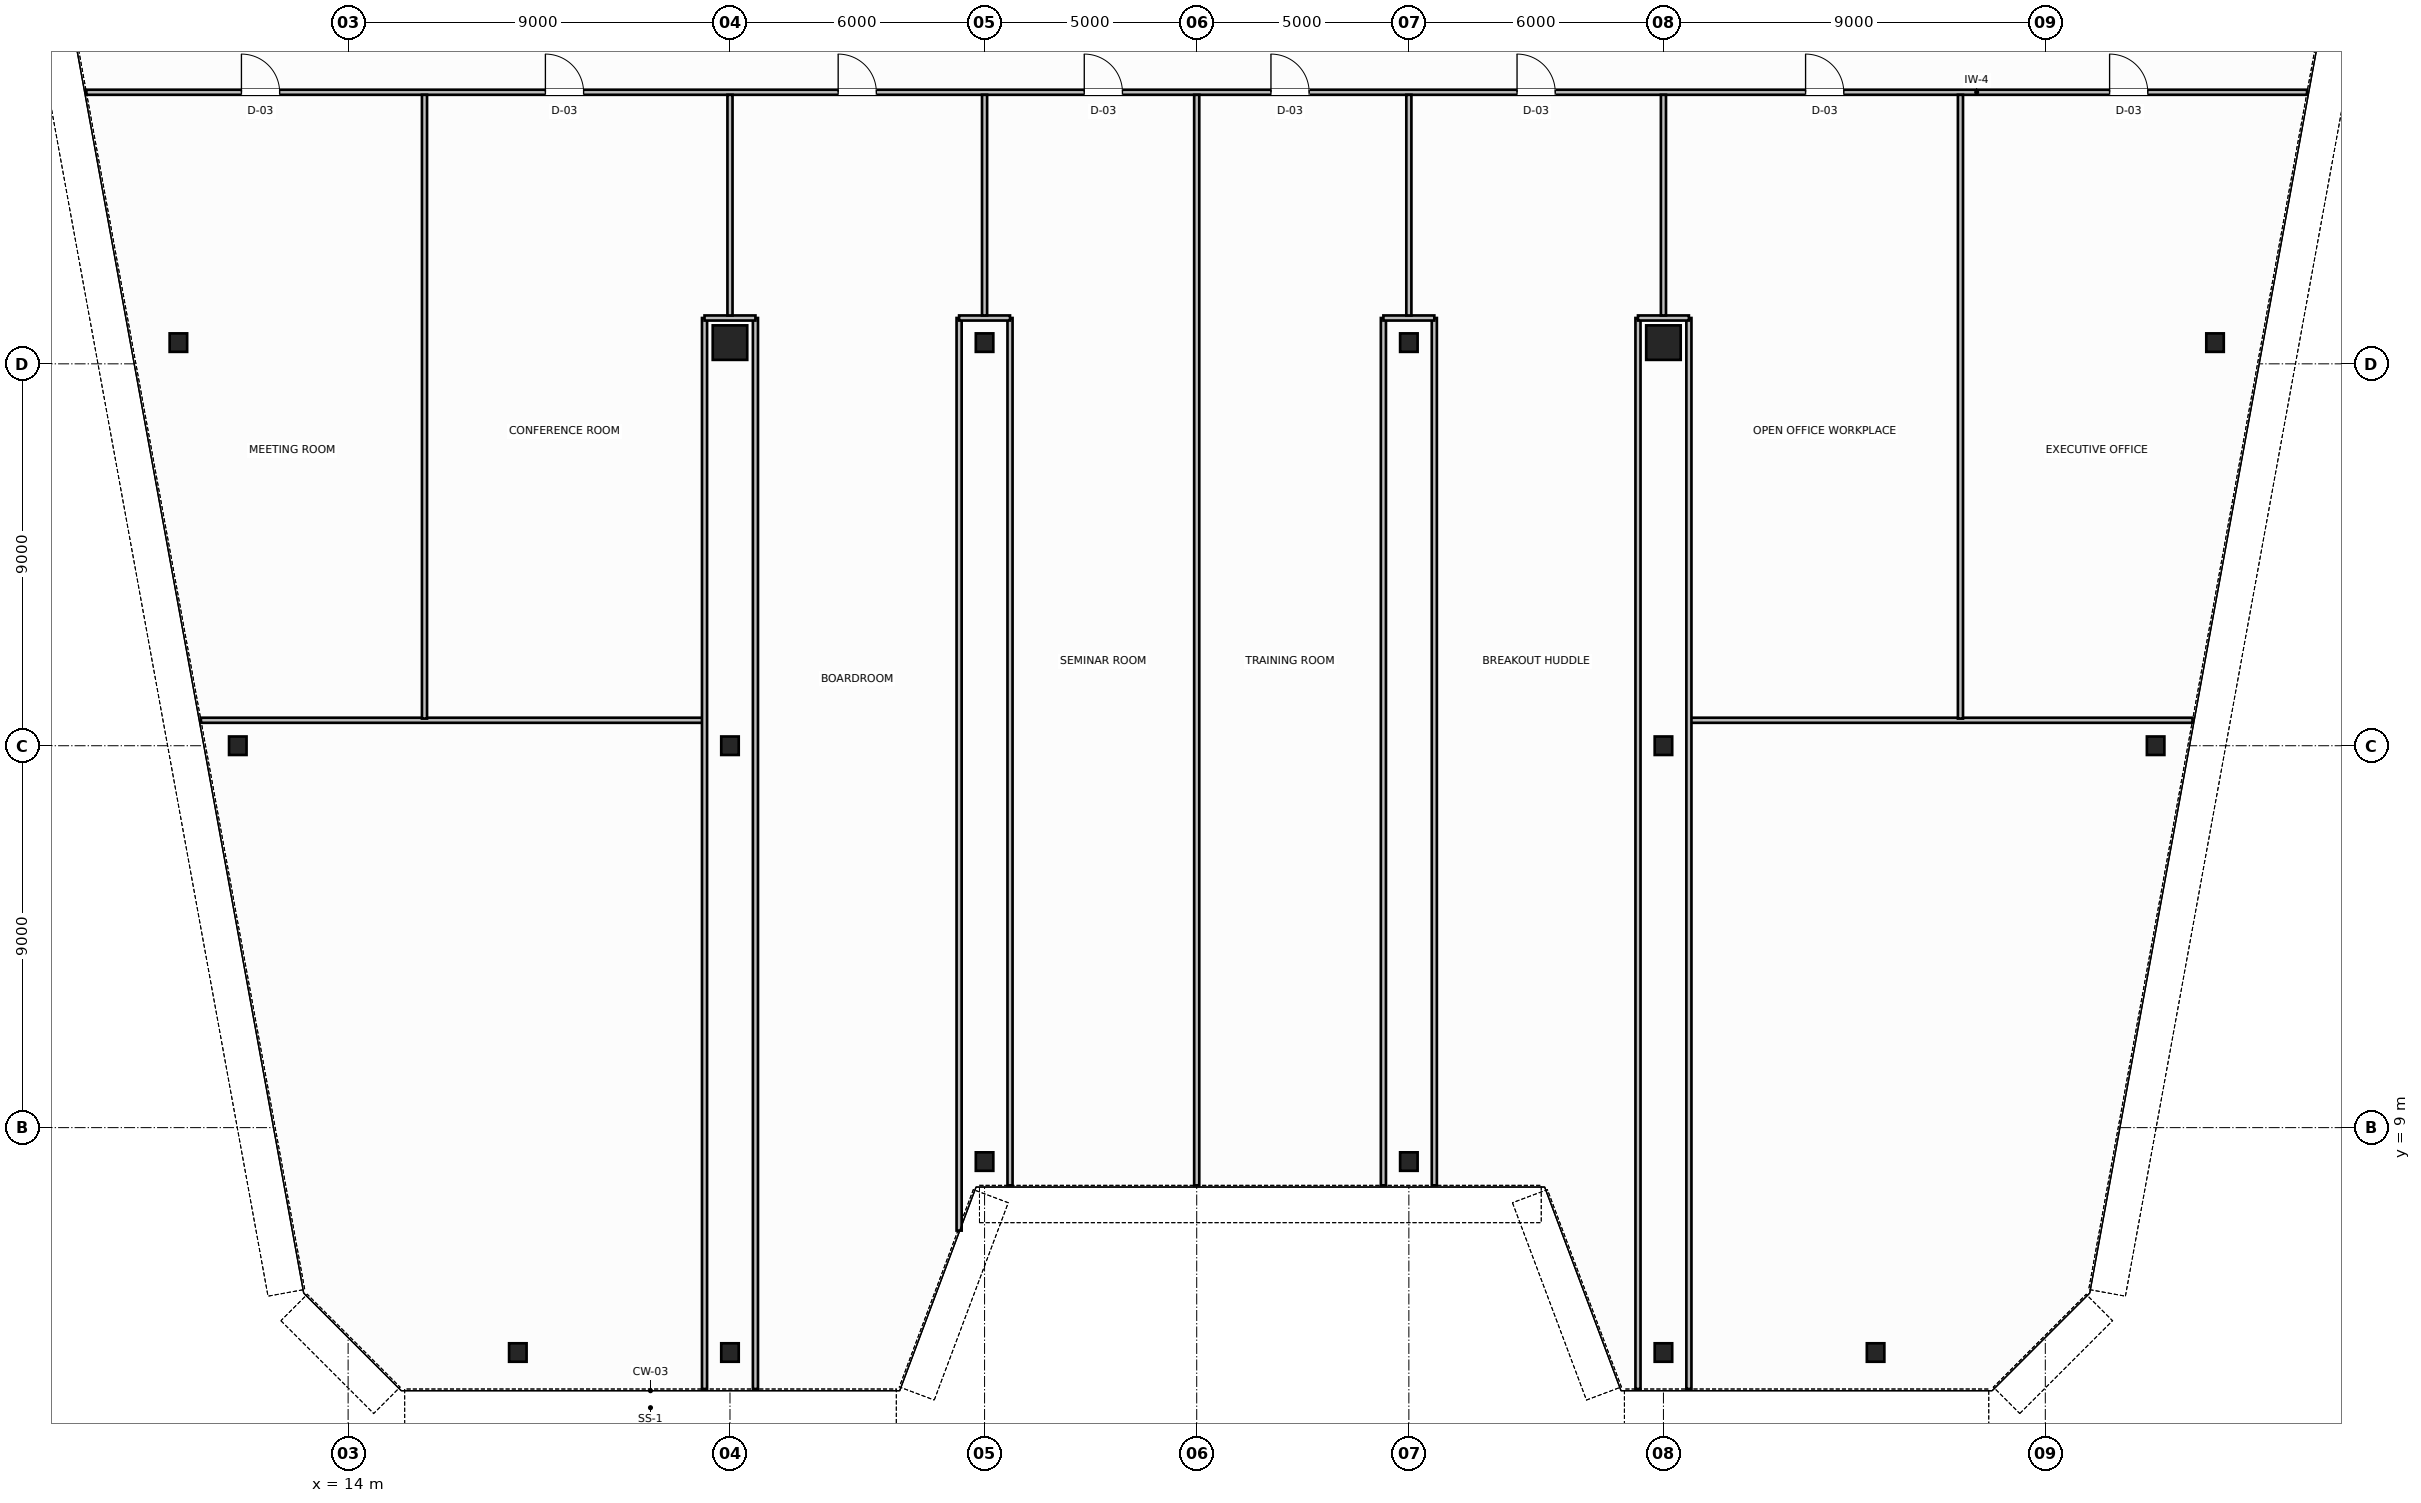
"""IFC4 building model, lengths in metres.
Left out: names, types, materials, properties, quantities, classifications, styles, units other than length and angle.
Written with IfcOpenShell. Run it as: python <this file> out.ifc"""

import sys

from ifc_helpers import new_model, si_unit, direction, frame, frame_2d, origin, origin_2d, place, context, subcontext, project, spatial, rectangle, hollow_circle, i_section, extrude, source, transform, mapped, element, fill, save


model = new_model("IFC4")
c1 = context("Model", 3, precision=1e-05, world=origin(), true_north=direction((0.0, 1.0)))
c2 = subcontext(c1, "Body", "Model", "MODEL_VIEW")
j1 = project(units=[si_unit("LENGTHUNIT", "METRE"), si_unit("PLANEANGLEUNIT", "RADIAN")], contexts=[c1])
p1 = place(None, origin())
s1 = spatial("IfcSite", under=j1, at=p1, CompositionType="ELEMENT")
p2 = place(p1, origin())
s2 = spatial("IfcBuilding", under=s1, at=p2, CompositionType="ELEMENT")
p3 = place(p2, frame((0.0, 0.0, 176.6)))
s3 = spatial("IfcBuildingStorey", under=s2, at=p3, CompositionType="ELEMENT", Elevation=176.6)
m1 = source(origin(), c2, "Body", "SweptSolid", [
    extrude(i_section(OverallWidth=0.412, OverallDepth=0.435, WebThickness=0.036, FlangeThickness=0.05, FilletRadius=0.015, at=origin_2d()), origin(), (0.0, 0.0, 1.0), 3.8),
])
for number, where, z_axis, x_axis in (
    (1, (10.0, 27.5, 0.0), (0.0, 0.0, 1.0), (1.0, 0.0, 0.0)),
    (2, (11.4, 18.0, 0.0), (0.0, 0.0, 1.0), (1.0, 0.0, 0.0)),
    (3, (58.0, 27.5, 0.0), (0.0, 0.0, 1.0), (1.0, 0.0, 0.0)),
    (4, (56.6, 18.0, 0.0), (0.0, 0.0, 1.0), (1.0, 0.0, 0.0)),
):
    element("IfcColumn", number, at=place(p3, frame(where, z_axis=z_axis, x_axis=x_axis)), inside=s3, PredefinedType="COLUMN", context=c2, shape_type="MappedRepresentation", body=[
        mapped(m1, transform((0.0, 0.0, 0.0), scale=1.0)),
    ])
m2 = source(origin(), c2, "Body", "SweptSolid", [
    extrude(hollow_circle(Radius=0.406, WallThickness=0.04, at=origin_2d()), origin(), (0.0, 0.0, 1.0), 3.8),
])
p4 = place(p3, frame((23.0, 27.5, 0.0), z_axis=(0.0, 0.0, 1.0), x_axis=(1.0, 0.0, 0.0)))
e5 = element("IfcColumn", 5, at=p4, inside=s3, PredefinedType="COLUMN", context=c2, shape_type="MappedRepresentation", body=[
    mapped(m2, transform((0.0, 0.0, 0.0), scale=1.0)),
])
m3 = source(origin(), c2, "Body", "SweptSolid", [
    extrude(i_section(OverallWidth=0.412, OverallDepth=0.435, WebThickness=0.036, FlangeThickness=0.05, FilletRadius=0.015, at=origin_2d()), origin(), (0.0, 0.0, 1.0), 3.8),
])
for number, where, z_axis, x_axis in (
    (6, (29.0, 27.5, 0.0), (0.0, 0.0, 1.0), (1.0, 0.0, 0.0)),
    (7, (39.0, 27.5, 0.0), (0.0, 0.0, 1.0), (1.0, 0.0, 0.0)),
):
    element("IfcColumn", number, at=place(p3, frame(where, z_axis=z_axis, x_axis=x_axis)), inside=s3, PredefinedType="COLUMN", context=c2, shape_type="MappedRepresentation", body=[
        mapped(m3, transform((0.0, 0.0, 0.0), scale=1.0)),
    ])
p5 = place(p3, frame((45.0, 27.5, 0.0), z_axis=(0.0, 0.0, 1.0), x_axis=(1.0, 0.0, 0.0)))
e8 = element("IfcColumn", 8, at=p5, inside=s3, PredefinedType="COLUMN", context=c2, shape_type="MappedRepresentation", body=[
    mapped(m2, transform((0.0, 0.0, 0.0), scale=1.0)),
])
for number, where, z_axis, x_axis in (
    (9, (23.0, 18.0, 0.0), (0.0, 0.0, 1.0), (1.0, 0.0, 0.0)),
    (10, (45.0, 18.0, 0.0), (0.0, 0.0, 1.0), (1.0, 0.0, 0.0)),
    (11, (18.0, 3.7, 0.0), (0.0, 0.0, 1.0), (1.0, 0.0, 0.0)),
    (12, (23.0, 3.7, 0.0), (0.0, 0.0, 1.0), (1.0, 0.0, 0.0)),
    (13, (29.0, 8.2, 0.0), (0.0, 0.0, 1.0), (1.0, 0.0, 0.0)),
    (14, (39.0, 8.2, 0.0), (0.0, 0.0, 1.0), (1.0, 0.0, 0.0)),
    (15, (45.0, 3.7, 0.0), (0.0, 0.0, 1.0), (1.0, 0.0, 0.0)),
    (16, (50.0, 3.7, 0.0), (0.0, 0.0, 1.0), (1.0, 0.0, 0.0)),
):
    element("IfcColumn", number, at=place(p3, frame(where, z_axis=z_axis, x_axis=x_axis)), inside=s3, PredefinedType="COLUMN", context=c2, shape_type="MappedRepresentation", body=[
        mapped(m3, transform((0.0, 0.0, 0.0), scale=1.0)),
    ])
p6 = place(p3, frame((7.831, 33.4, 0.0), z_axis=(0.0, 0.0, 1.0), x_axis=(1.0, 0.0, 0.0)))
e17 = element("IfcWall", 17, at=p6, inside=s3, PredefinedType="PARTITIONING", context=c2, shape_type="SweptSolid", body=[
    extrude(rectangle(XDim=52.338, YDim=0.12, at=frame_2d((26.169, 0.0))), origin(), (0.0, 0.0, 1.0), 3.58),
])
p7 = place(p6, frame((3.655, 0.0, 0.0)))
e18 = element("IfcOpeningElement", 18, at=p7, cuts=e17, PredefinedType="OPENING", context=c2, shape_type="SweptSolid", body=[
    extrude(rectangle(XDim=0.9, YDim=2.15, at=frame_2d((0.45, 1.075))), frame((0.0, 0.07, 0.0), z_axis=(0.0, -1.0, 0.0), x_axis=(1.0, 0.0, 0.0)), (0.0, 0.0, 1.0), 0.14),
])
p8 = place(p6, frame((10.819, 0.0, 0.0)))
e19 = element("IfcOpeningElement", 19, at=p8, cuts=e17, PredefinedType="OPENING", context=c2, shape_type="SweptSolid", body=[
    extrude(rectangle(XDim=0.9, YDim=2.15, at=frame_2d((0.45, 1.075))), frame((0.0, 0.07, 0.0), z_axis=(0.0, -1.0, 0.0), x_axis=(1.0, 0.0, 0.0)), (0.0, 0.0, 1.0), 0.14),
])
p9 = place(p6, frame((17.719, 0.0, 0.0)))
e20 = element("IfcOpeningElement", 20, at=p9, cuts=e17, PredefinedType="OPENING", context=c2, shape_type="SweptSolid", body=[
    extrude(rectangle(XDim=0.9, YDim=2.15, at=frame_2d((0.45, 1.075))), frame((0.0, 0.07, 0.0), z_axis=(0.0, -1.0, 0.0), x_axis=(1.0, 0.0, 0.0)), (0.0, 0.0, 1.0), 0.14),
])
p10 = place(p6, frame((23.519, 0.0, 0.0)))
e21 = element("IfcOpeningElement", 21, at=p10, cuts=e17, PredefinedType="OPENING", context=c2, shape_type="SweptSolid", body=[
    extrude(rectangle(XDim=0.9, YDim=2.15, at=frame_2d((0.45, 1.075))), frame((0.0, 0.07, 0.0), z_axis=(0.0, -1.0, 0.0), x_axis=(1.0, 0.0, 0.0)), (0.0, 0.0, 1.0), 0.14),
])
p11 = place(p6, frame((27.919, 0.0, 0.0)))
e22 = element("IfcOpeningElement", 22, at=p11, cuts=e17, PredefinedType="OPENING", context=c2, shape_type="SweptSolid", body=[
    extrude(rectangle(XDim=0.9, YDim=2.15, at=frame_2d((0.45, 1.075))), frame((0.0, 0.07, 0.0), z_axis=(0.0, -1.0, 0.0), x_axis=(1.0, 0.0, 0.0)), (0.0, 0.0, 1.0), 0.14),
])
p12 = place(p6, frame((33.719, 0.0, 0.0)))
e23 = element("IfcOpeningElement", 23, at=p12, cuts=e17, PredefinedType="OPENING", context=c2, shape_type="SweptSolid", body=[
    extrude(rectangle(XDim=0.9, YDim=2.15, at=frame_2d((0.45, 1.075))), frame((0.0, 0.07, 0.0), z_axis=(0.0, -1.0, 0.0), x_axis=(1.0, 0.0, 0.0)), (0.0, 0.0, 1.0), 0.14),
])
p13 = place(p6, frame((40.519, 0.0, 0.0)))
e24 = element("IfcOpeningElement", 24, at=p13, cuts=e17, PredefinedType="OPENING", context=c2, shape_type="SweptSolid", body=[
    extrude(rectangle(XDim=0.9, YDim=2.15, at=frame_2d((0.45, 1.075))), frame((0.0, 0.07, 0.0), z_axis=(0.0, -1.0, 0.0), x_axis=(1.0, 0.0, 0.0)), (0.0, 0.0, 1.0), 0.14),
])
p14 = place(p6, frame((47.684, 0.0, 0.0)))
e25 = element("IfcOpeningElement", 25, at=p14, cuts=e17, PredefinedType="OPENING", context=c2, shape_type="SweptSolid", body=[
    extrude(rectangle(XDim=0.9, YDim=2.15, at=frame_2d((0.45, 1.075))), frame((0.0, 0.07, 0.0), z_axis=(0.0, -1.0, 0.0), x_axis=(1.0, 0.0, 0.0)), (0.0, 0.0, 1.0), 0.14),
])
for number, where, z_axis, x_axis in (
    (26, (10.531, 18.6, 0.0), (0.0, 0.0, 1.0), (1.0, 0.0, 0.0)),
    (27, (45.64, 18.6, 0.0), (0.0, 0.0, 1.0), (1.0, 0.0, 0.0)),
):
    element("IfcWall", number, at=place(p3, frame(where, z_axis=z_axis, x_axis=x_axis)), inside=s3, PredefinedType="PARTITIONING", context=c2, shape_type="SweptSolid", body=[
        extrude(rectangle(XDim=11.83, YDim=0.12, at=frame_2d((5.915, 0.0))), origin(), (0.0, 0.0, 1.0), 3.58),
    ])
for number, where, z_axis, x_axis in (
    (28, (22.4, 2.84, 0.0), (0.0, 0.0, 1.0), (0.0, 1.0, 0.0)),
    (29, (23.6, 2.84, 0.0), (0.0, 0.0, 1.0), (0.0, 1.0, 0.0)),
):
    element("IfcWall", number, at=place(p3, frame(where, z_axis=z_axis, x_axis=x_axis)), inside=s3, PredefinedType="PARTITIONING", context=c2, shape_type="SweptSolid", body=[
        extrude(rectangle(XDim=25.24, YDim=0.12, at=frame_2d((12.62, 0.0))), origin(), (0.0, 0.0, 1.0), 3.58),
    ])
p15 = place(p3, frame((22.4, 28.08, 0.0), z_axis=(0.0, 0.0, 1.0), x_axis=(1.0, 0.0, 0.0)))
e30 = element("IfcWall", 30, at=p15, inside=s3, PredefinedType="PARTITIONING", context=c2, shape_type="SweptSolid", body=[
    extrude(rectangle(XDim=1.2, YDim=0.12, at=frame_2d((0.6, 0.0))), origin(), (0.0, 0.0, 1.0), 3.58),
])
p16 = place(p3, frame((23.0, 28.14, 0.0), z_axis=(0.0, 0.0, 1.0), x_axis=(0.0, 1.0, 0.0)))
e31 = element("IfcWall", 31, at=p16, inside=s3, PredefinedType="PARTITIONING", context=c2, shape_type="SweptSolid", body=[
    extrude(rectangle(XDim=5.2, YDim=0.12, at=frame_2d((2.6, 0.0))), origin(), (0.0, 0.0, 1.0), 2.37),
])
p17 = place(p3, frame((28.4, 6.573, 0.0), z_axis=(0.0, 0.0, 1.0), x_axis=(0.0, 1.0, 0.0)))
e32 = element("IfcWall", 32, at=p17, inside=s3, PredefinedType="PARTITIONING", context=c2, shape_type="SweptSolid", body=[
    extrude(rectangle(XDim=21.507, YDim=0.12, at=frame_2d((10.753, 0.0))), origin(), (0.0, 0.0, 1.0), 3.58),
])
p18 = place(p3, frame((29.6, 7.64, 0.0), z_axis=(0.0, 0.0, 1.0), x_axis=(0.0, 1.0, 0.0)))
e33 = element("IfcWall", 33, at=p18, inside=s3, PredefinedType="PARTITIONING", context=c2, shape_type="SweptSolid", body=[
    extrude(rectangle(XDim=20.44, YDim=0.12, at=frame_2d((10.22, 0.0))), origin(), (0.0, 0.0, 1.0), 3.58),
])
p19 = place(p3, frame((28.4, 28.08, 0.0), z_axis=(0.0, 0.0, 1.0), x_axis=(1.0, 0.0, 0.0)))
e34 = element("IfcWall", 34, at=p19, inside=s3, PredefinedType="PARTITIONING", context=c2, shape_type="SweptSolid", body=[
    extrude(rectangle(XDim=1.2, YDim=0.12, at=frame_2d((0.6, 0.0))), origin(), (0.0, 0.0, 1.0), 3.58),
])
p20 = place(p3, frame((29.0, 28.14, 0.0), z_axis=(0.0, 0.0, 1.0), x_axis=(0.0, 1.0, 0.0)))
e35 = element("IfcWall", 35, at=p20, inside=s3, PredefinedType="PARTITIONING", context=c2, shape_type="SweptSolid", body=[
    extrude(rectangle(XDim=5.2, YDim=0.12, at=frame_2d((2.6, 0.0))), origin(), (0.0, 0.0, 1.0), 2.37),
])
for number, where, z_axis, x_axis in (
    (36, (38.4, 7.64, 0.0), (0.0, 0.0, 1.0), (0.0, 1.0, 0.0)),
    (37, (39.6, 7.64, 0.0), (0.0, 0.0, 1.0), (0.0, 1.0, 0.0)),
):
    element("IfcWall", number, at=place(p3, frame(where, z_axis=z_axis, x_axis=x_axis)), inside=s3, PredefinedType="PARTITIONING", context=c2, shape_type="SweptSolid", body=[
        extrude(rectangle(XDim=20.44, YDim=0.12, at=frame_2d((10.22, 0.0))), origin(), (0.0, 0.0, 1.0), 3.58),
    ])
p21 = place(p3, frame((38.4, 28.08, 0.0), z_axis=(0.0, 0.0, 1.0), x_axis=(1.0, 0.0, 0.0)))
e38 = element("IfcWall", 38, at=p21, inside=s3, PredefinedType="PARTITIONING", context=c2, shape_type="SweptSolid", body=[
    extrude(rectangle(XDim=1.2, YDim=0.12, at=frame_2d((0.6, 0.0))), origin(), (0.0, 0.0, 1.0), 3.58),
])
p22 = place(p3, frame((39.0, 28.14, 0.0), z_axis=(0.0, 0.0, 1.0), x_axis=(0.0, 1.0, 0.0)))
e39 = element("IfcWall", 39, at=p22, inside=s3, PredefinedType="PARTITIONING", context=c2, shape_type="SweptSolid", body=[
    extrude(rectangle(XDim=5.2, YDim=0.12, at=frame_2d((2.6, 0.0))), origin(), (0.0, 0.0, 1.0), 2.37),
])
for number, where, z_axis, x_axis in (
    (40, (44.4, 2.84, 0.0), (0.0, 0.0, 1.0), (0.0, 1.0, 0.0)),
    (41, (45.6, 2.84, 0.0), (0.0, 0.0, 1.0), (0.0, 1.0, 0.0)),
):
    element("IfcWall", number, at=place(p3, frame(where, z_axis=z_axis, x_axis=x_axis)), inside=s3, PredefinedType="PARTITIONING", context=c2, shape_type="SweptSolid", body=[
        extrude(rectangle(XDim=25.24, YDim=0.12, at=frame_2d((12.62, 0.0))), origin(), (0.0, 0.0, 1.0), 3.58),
    ])
p23 = place(p3, frame((44.4, 28.08, 0.0), z_axis=(0.0, 0.0, 1.0), x_axis=(1.0, 0.0, 0.0)))
e42 = element("IfcWall", 42, at=p23, inside=s3, PredefinedType="PARTITIONING", context=c2, shape_type="SweptSolid", body=[
    extrude(rectangle(XDim=1.2, YDim=0.12, at=frame_2d((0.6, 0.0))), origin(), (0.0, 0.0, 1.0), 3.58),
])
p24 = place(p3, frame((45.0, 28.14, 0.0), z_axis=(0.0, 0.0, 1.0), x_axis=(0.0, 1.0, 0.0)))
e43 = element("IfcWall", 43, at=p24, inside=s3, PredefinedType="PARTITIONING", context=c2, shape_type="SweptSolid", body=[
    extrude(rectangle(XDim=5.2, YDim=0.12, at=frame_2d((2.6, 0.0))), origin(), (0.0, 0.0, 1.0), 2.37),
])
p25 = place(p3, frame((15.8, 18.64, 0.0), z_axis=(0.0, 0.0, 1.0), x_axis=(0.0, 1.0, 0.0)))
e44 = element("IfcWall", 44, at=p25, inside=s3, PredefinedType="PARTITIONING", context=c2, shape_type="SweptSolid", body=[
    extrude(rectangle(XDim=14.7, YDim=0.12, at=frame_2d((7.35, 0.0))), origin(), (0.0, 0.0, 1.0), 3.58),
])
p26 = place(p3, frame((34.0, 7.64, 0.0), z_axis=(0.0, 0.0, 1.0), x_axis=(0.0, 1.0, 0.0)))
e45 = element("IfcWall", 45, at=p26, inside=s3, PredefinedType="PARTITIONING", context=c2, shape_type="SweptSolid", body=[
    extrude(rectangle(XDim=25.7, YDim=0.12, at=frame_2d((12.85, 0.0))), origin(), (0.0, 0.0, 1.0), 3.58),
])
p27 = place(p3, frame((52.0, 18.64, 0.0), z_axis=(0.0, 0.0, 1.0), x_axis=(0.0, 1.0, 0.0)))
e46 = element("IfcWall", 46, at=p27, inside=s3, PredefinedType="PARTITIONING", context=c2, shape_type="SweptSolid", body=[
    extrude(rectangle(XDim=14.7, YDim=0.12, at=frame_2d((7.35, 0.0))), origin(), (0.0, 0.0, 1.0), 3.58),
])
m4 = source(origin(), c2, "Body", "SweptSolid", [
    extrude(rectangle(XDim=0.9, YDim=2.15, at=frame_2d((0.45, 1.075))), frame((0.0, 0.025, 0.0), z_axis=(0.0, -1.0, 0.0), x_axis=(1.0, 0.0, 0.0)), (0.0, 0.0, 1.0), 0.05),
])
p28 = place(p7, origin())
e47 = element("IfcDoor", 47, at=p28, inside=s3, OperationType="SINGLE_SWING_LEFT", PredefinedType="DOOR", context=c2, shape_type="MappedRepresentation", body=[
    mapped(m4, transform((0.0, 0.0, 0.0), scale=1.0)),
])
fill(e18, e47)
p29 = place(p8, origin())
e48 = element("IfcDoor", 48, at=p29, inside=s3, OperationType="SINGLE_SWING_RIGHT", PredefinedType="DOOR", context=c2, shape_type="MappedRepresentation", body=[
    mapped(m4, transform((0.0, 0.0, 0.0), scale=1.0)),
])
fill(e19, e48)
p30 = place(p9, origin())
e49 = element("IfcDoor", 49, at=p30, inside=s3, OperationType="SINGLE_SWING_LEFT", PredefinedType="DOOR", context=c2, shape_type="MappedRepresentation", body=[
    mapped(m4, transform((0.0, 0.0, 0.0), scale=1.0)),
])
fill(e20, e49)
p31 = place(p10, origin())
e50 = element("IfcDoor", 50, at=p31, inside=s3, OperationType="SINGLE_SWING_RIGHT", PredefinedType="DOOR", context=c2, shape_type="MappedRepresentation", body=[
    mapped(m4, transform((0.0, 0.0, 0.0), scale=1.0)),
])
fill(e21, e50)
p32 = place(p11, origin())
e51 = element("IfcDoor", 51, at=p32, inside=s3, OperationType="SINGLE_SWING_LEFT", PredefinedType="DOOR", context=c2, shape_type="MappedRepresentation", body=[
    mapped(m4, transform((0.0, 0.0, 0.0), scale=1.0)),
])
fill(e22, e51)
p33 = place(p12, origin())
e52 = element("IfcDoor", 52, at=p33, inside=s3, OperationType="SINGLE_SWING_RIGHT", PredefinedType="DOOR", context=c2, shape_type="MappedRepresentation", body=[
    mapped(m4, transform((0.0, 0.0, 0.0), scale=1.0)),
])
fill(e23, e52)
p34 = place(p13, origin())
e53 = element("IfcDoor", 53, at=p34, inside=s3, OperationType="SINGLE_SWING_LEFT", PredefinedType="DOOR", context=c2, shape_type="MappedRepresentation", body=[
    mapped(m4, transform((0.0, 0.0, 0.0), scale=1.0)),
])
fill(e24, e53)
p35 = place(p14, origin())
e54 = element("IfcDoor", 54, at=p35, inside=s3, OperationType="SINGLE_SWING_RIGHT", PredefinedType="DOOR", context=c2, shape_type="MappedRepresentation", body=[
    mapped(m4, transform((0.0, 0.0, 0.0), scale=1.0)),
])
fill(e25, e54)
save(model, sys.argv[1])
